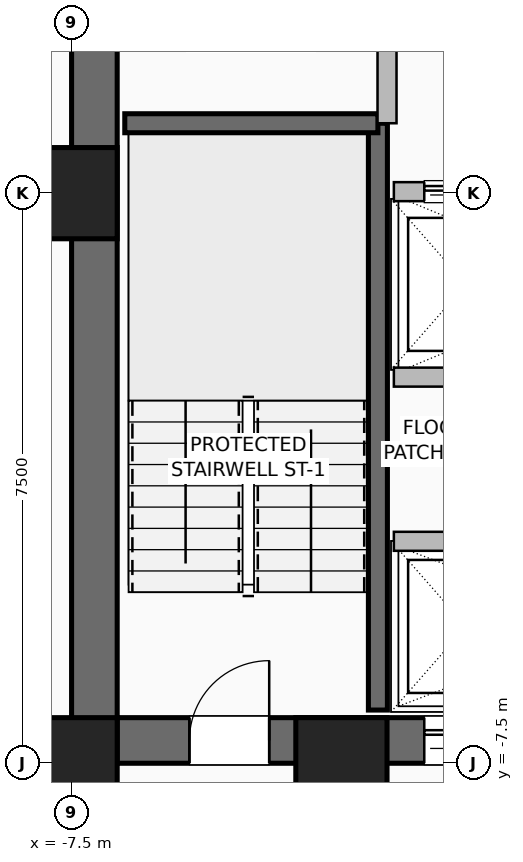
"""IFC4 building model, lengths in metres.
Left out: names, types, materials, properties, quantities, classifications, styles, units other than length and angle.
Written with IfcOpenShell. Run it as: python <this file> out.ifc"""

import sys

from ifc_helpers import new_model, si_unit, direction, frame, frame_2d, origin, origin_2d, place, context, subcontext, project, spatial, rectangle, hollow_rectangle, extrude, element, fill, save


model = new_model("IFC4")
c1 = context("Model", 3, precision=1e-05, world=origin(), true_north=direction((0.0, 1.0)))
c2 = subcontext(c1, "Body", "Model", "MODEL_VIEW")
j1 = project(units=[si_unit("LENGTHUNIT", "METRE"), si_unit("PLANEANGLEUNIT", "RADIAN")], contexts=[c1])
p1 = place(None, origin())
s1 = spatial("IfcSite", under=j1, at=p1, CompositionType="ELEMENT")
p2 = place(p1, origin())
s2 = spatial("IfcBuilding", under=s1, at=p2, CompositionType="ELEMENT")
p3 = place(p2, frame((0.0, 0.0, 48.0)))
s3 = spatial("IfcBuildingStorey", under=s2, at=p3, CompositionType="ELEMENT", Elevation=48.0)
for number, where, z_axis, x_axis in (
    (1, (-7.5, -7.5, 0.0), (0.0, 0.0, 1.0), (1.0, 0.0, 0.0)),
    (2, (-3.95, -7.5, 0.0), (0.0, 0.0, 1.0), (1.0, 0.0, 0.0)),
    (3, (-7.5, 0.0, 0.0), (0.0, 0.0, 1.0), (1.0, 0.0, 0.0)),
):
    element("IfcColumn", number, at=place(p3, frame(where, z_axis=z_axis, x_axis=x_axis)), inside=s3, PredefinedType="COLUMN", context=c2, shape_type="SweptSolid", body=[
        extrude(hollow_rectangle(XDim=1.2, YDim=1.2, WallThickness=0.055, at=origin_2d()), origin(), (0.0, 0.0, 1.0), 3.5),
    ])
p4 = place(p3, frame((-7.5, -7.2, 0.0), z_axis=(0.0, 0.0, 1.0), x_axis=(1.0, 0.0, 0.0)))
e4 = element("IfcWall", 4, at=p4, inside=s3, PredefinedType="SHEAR", context=c2, shape_type="SweptSolid", body=[
    extrude(rectangle(XDim=15.0, YDim=0.6, at=frame_2d((7.5, 0.0))), origin(), (0.0, 0.0, 1.0), 3.25),
])
p5 = place(p4, frame((1.55, 0.0, 0.0)))
e5 = element("IfcOpeningElement", 5, at=p5, cuts=e4, PredefinedType="OPENING", context=c2, shape_type="SweptSolid", body=[
    extrude(rectangle(XDim=1.05, YDim=2.08, at=frame_2d((0.525, 1.04))), frame((0.0, 0.31, 0.0), z_axis=(0.0, -1.0, 0.0), x_axis=(1.0, 0.0, 0.0)), (0.0, 0.0, 1.0), 0.62),
])
p6 = place(p4, frame((12.4, 0.0, 0.0)))
e6 = element("IfcOpeningElement", 6, at=p6, cuts=e4, PredefinedType="OPENING", context=c2, shape_type="SweptSolid", body=[
    extrude(rectangle(XDim=1.05, YDim=2.08, at=frame_2d((0.525, 1.04))), frame((0.0, 0.31, 0.0), z_axis=(0.0, -1.0, 0.0), x_axis=(1.0, 0.0, 0.0)), (0.0, 0.0, 1.0), 0.62),
])
p7 = place(p4, frame((4.64, 0.0, 0.0)))
e7 = element("IfcOpeningElement", 7, at=p7, cuts=e4, PredefinedType="OPENING", context=c2, shape_type="SweptSolid", body=[
    extrude(rectangle(XDim=1.1, YDim=2.2, at=frame_2d((0.55, 1.1))), frame((0.0, 0.31, 0.0), z_axis=(0.0, -1.0, 0.0), x_axis=(1.0, 0.0, 0.0)), (0.0, 0.0, 1.0), 0.62),
])
p8 = place(p4, frame((6.52, 0.0, 0.0)))
e8 = element("IfcOpeningElement", 8, at=p8, cuts=e4, PredefinedType="OPENING", context=c2, shape_type="SweptSolid", body=[
    extrude(rectangle(XDim=1.1, YDim=2.2, at=frame_2d((0.55, 1.1))), frame((0.0, 0.31, 0.0), z_axis=(0.0, -1.0, 0.0), x_axis=(1.0, 0.0, 0.0)), (0.0, 0.0, 1.0), 0.62),
])
p9 = place(p4, frame((8.4, 0.0, 0.0)))
e9 = element("IfcOpeningElement", 9, at=p9, cuts=e4, PredefinedType="OPENING", context=c2, shape_type="SweptSolid", body=[
    extrude(rectangle(XDim=1.1, YDim=2.2, at=frame_2d((0.55, 1.1))), frame((0.0, 0.31, 0.0), z_axis=(0.0, -1.0, 0.0), x_axis=(1.0, 0.0, 0.0)), (0.0, 0.0, 1.0), 0.62),
])
p10 = place(p3, frame((-7.2, -7.5, 0.0), z_axis=(0.0, 0.0, 1.0), x_axis=(0.0, 1.0, 0.0)))
e10 = element("IfcWall", 10, at=p10, inside=s3, PredefinedType="SHEAR", context=c2, shape_type="SweptSolid", body=[
    extrude(rectangle(XDim=15.0, YDim=0.6, at=frame_2d((7.5, 0.0))), origin(), (0.0, 0.0, 1.0), 3.25),
])
p11 = place(p10, frame((9.5, 0.0, 0.0)))
e11 = element("IfcOpeningElement", 11, at=p11, cuts=e10, PredefinedType="OPENING", context=c2, shape_type="SweptSolid", body=[
    extrude(rectangle(XDim=1.0, YDim=2.08, at=frame_2d((0.5, 1.04))), frame((0.0, 0.31, 0.0), z_axis=(0.0, -1.0, 0.0), x_axis=(1.0, 0.0, 0.0)), (0.0, 0.0, 1.0), 0.62),
])
p12 = place(p3, frame((-3.47, -6.8, 0.0), z_axis=(0.0, 0.0, 1.0), x_axis=(0.0, 1.0, 0.0)))
e12 = element("IfcWall", 12, at=p12, inside=s3, PredefinedType="SHEAR", context=c2, shape_type="SweptSolid", body=[
    extrude(rectangle(XDim=7.72, YDim=0.25, at=frame_2d((3.86, 0.0))), origin(), (0.0, 0.0, 1.0), 3.25),
])
p13 = place(p3, frame((-6.8, 0.92, 0.0), z_axis=(0.0, 0.0, 1.0), x_axis=(1.0, 0.0, 0.0)))
e13 = element("IfcWall", 13, at=p13, inside=s3, PredefinedType="SHEAR", context=c2, shape_type="SweptSolid", body=[
    extrude(rectangle(XDim=3.33, YDim=0.25, at=frame_2d((1.665, 0.0))), origin(), (0.0, 0.0, 1.0), 3.25),
])
p14 = place(p3, frame((-3.26, -4.58, 0.0), z_axis=(0.0, 0.0, 1.0), x_axis=(1.0, 0.0, 0.0)))
e14 = element("IfcWall", 14, at=p14, inside=s3, PredefinedType="SHEAR", context=c2, shape_type="SweptSolid", body=[
    extrude(rectangle(XDim=5.64, YDim=0.25, at=frame_2d((2.82, 0.0))), origin(), (0.0, 0.0, 1.0), 3.25),
])
p15 = place(p3, frame((-3.26, 0.02, 0.0), z_axis=(0.0, 0.0, 1.0), x_axis=(1.0, 0.0, 0.0)))
e15 = element("IfcWall", 15, at=p15, inside=s3, PredefinedType="SHEAR", context=c2, shape_type="SweptSolid", body=[
    extrude(rectangle(XDim=5.64, YDim=0.25, at=frame_2d((2.82, 0.0))), origin(), (0.0, 0.0, 1.0), 3.25),
])
p16 = place(p15, frame((0.4, 0.0, 0.0)))
e16 = element("IfcOpeningElement", 16, at=p16, cuts=e15, PredefinedType="OPENING", context=c2, shape_type="SweptSolid", body=[
    extrude(rectangle(XDim=1.1, YDim=2.2, at=frame_2d((0.55, 1.1))), frame((0.0, 0.135, 0.0), z_axis=(0.0, -1.0, 0.0), x_axis=(1.0, 0.0, 0.0)), (0.0, 0.0, 1.0), 0.27),
])
p17 = place(p15, frame((2.28, 0.0, 0.0)))
e17 = element("IfcOpeningElement", 17, at=p17, cuts=e15, PredefinedType="OPENING", context=c2, shape_type="SweptSolid", body=[
    extrude(rectangle(XDim=1.1, YDim=2.2, at=frame_2d((0.55, 1.1))), frame((0.0, 0.135, 0.0), z_axis=(0.0, -1.0, 0.0), x_axis=(1.0, 0.0, 0.0)), (0.0, 0.0, 1.0), 0.27),
])
p18 = place(p15, frame((4.16, 0.0, 0.0)))
e18 = element("IfcOpeningElement", 18, at=p18, cuts=e15, PredefinedType="OPENING", context=c2, shape_type="SweptSolid", body=[
    extrude(rectangle(XDim=1.1, YDim=2.2, at=frame_2d((0.55, 1.1))), frame((0.0, 0.135, 0.0), z_axis=(0.0, -1.0, 0.0), x_axis=(1.0, 0.0, 0.0)), (0.0, 0.0, 1.0), 0.27),
])
p19 = place(p3, frame((-3.26, -2.42, 0.0), z_axis=(0.0, 0.0, 1.0), x_axis=(1.0, 0.0, 0.0)))
e19 = element("IfcWall", 19, at=p19, inside=s3, PredefinedType="SHEAR", context=c2, shape_type="SweptSolid", body=[
    extrude(rectangle(XDim=5.64, YDim=0.25, at=frame_2d((2.82, 0.0))), origin(), (0.0, 0.0, 1.0), 3.25),
])
p20 = place(p3, frame((-3.35, 0.92, 0.0), z_axis=(0.0, 0.0, 1.0), x_axis=(0.0, 1.0, 0.0)))
e20 = element("IfcWall", 20, at=p20, inside=s3, PredefinedType="SHEAR", context=c2, shape_type="SweptSolid", body=[
    extrude(rectangle(XDim=3.62, YDim=0.25, at=frame_2d((1.81, 0.0))), origin(), (0.0, 0.0, 1.0), 3.25),
])
p21 = place(p20, frame((1.85, 0.0, 0.0)))
e21 = element("IfcOpeningElement", 21, at=p21, cuts=e20, PredefinedType="OPENING", context=c2, shape_type="SweptSolid", body=[
    extrude(rectangle(XDim=1.0, YDim=2.08, at=frame_2d((0.5, 1.04))), frame((0.0, 0.135, 0.0), z_axis=(0.0, -1.0, 0.0), x_axis=(1.0, 0.0, 0.0)), (0.0, 0.0, 1.0), 0.27),
])
p22 = place(p5, origin())
e22 = element("IfcDoor", 22, at=p22, inside=s3, OperationType="SINGLE_SWING_RIGHT", PredefinedType="DOOR", context=c2, shape_type="SweptSolid", body=[
    extrude(rectangle(XDim=1.05, YDim=2.08, at=frame_2d((0.525, 1.04))), frame((0.0, 0.025, 0.0), z_axis=(0.0, -1.0, 0.0), x_axis=(1.0, 0.0, 0.0)), (0.0, 0.0, 1.0), 0.05),
])
fill(e5, e22)
p23 = place(p7, origin())
e23 = element("IfcDoor", 23, at=p23, inside=s3, OperationType="DOUBLE_DOOR_SLIDING", PredefinedType="DOOR", context=c2, shape_type="SweptSolid", body=[
    extrude(rectangle(XDim=1.1, YDim=2.2, at=frame_2d((0.55, 1.1))), frame((0.0, 0.025, 0.0), z_axis=(0.0, -1.0, 0.0), x_axis=(1.0, 0.0, 0.0)), (0.0, 0.0, 1.0), 0.05),
])
fill(e7, e23)
p24 = place(p16, origin())
e24 = element("IfcDoor", 24, at=p24, inside=s3, OperationType="DOUBLE_DOOR_SLIDING", PredefinedType="DOOR", context=c2, shape_type="SweptSolid", body=[
    extrude(rectangle(XDim=1.1, YDim=2.2, at=frame_2d((0.55, 1.1))), frame((0.0, 0.025, 0.0), z_axis=(0.0, -1.0, 0.0), x_axis=(1.0, 0.0, 0.0)), (0.0, 0.0, 1.0), 0.05),
])
fill(e16, e24)
save(model, sys.argv[1])
